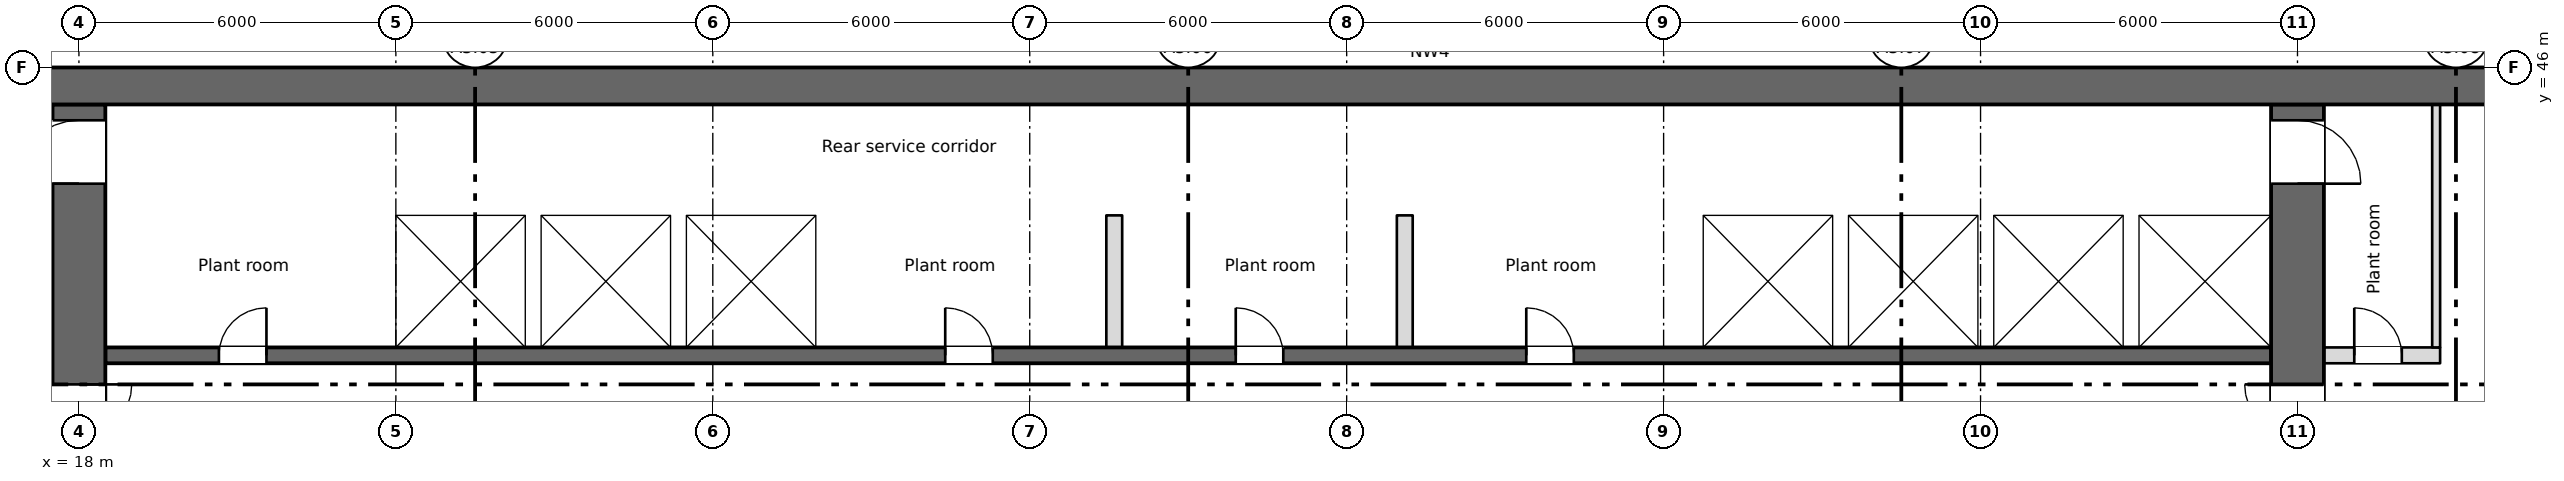
"""IFC4 building model, lengths in metres.
Left out: names, types, materials, properties, quantities, classifications, styles, units other than length and angle.
Written with IfcOpenShell. Run it as: python <this file> out.ifc"""

import sys

from ifc_helpers import new_model, si_unit, direction, frame, frame_2d, origin, place, context, subcontext, project, spatial, rectangle, extrude, element, fill, save


model = new_model("IFC4")
c1 = context("Model", 3, precision=1e-05, world=origin(), true_north=direction((0.0, 1.0)))
c2 = subcontext(c1, "Body", "Model", "MODEL_VIEW")
j1 = project(units=[si_unit("LENGTHUNIT", "METRE"), si_unit("PLANEANGLEUNIT", "RADIAN")], contexts=[c1])
p1 = place(None, origin())
s1 = spatial("IfcSite", under=j1, at=p1, CompositionType="ELEMENT")
p2 = place(p1, origin())
s2 = spatial("IfcBuilding", under=s1, at=p2, CompositionType="ELEMENT")
p3 = place(p2, frame((0.0, 0.0, 226.75)))
s3 = spatial("IfcBuildingStorey", under=s2, at=p3, CompositionType="ELEMENT", Elevation=226.75)
p4 = place(p3, frame((11.55, 45.65, 0.0), z_axis=(0.0, 0.0, 1.0), x_axis=(1.0, 0.0, 0.0)))
e1 = element("IfcWall", 1, at=p4, inside=s3, PredefinedType="SHEAR", context=c2, shape_type="SweptSolid", body=[
    extrude(rectangle(XDim=54.9, YDim=0.7, at=frame_2d((27.45, 0.0))), origin(), (0.0, 0.0, 1.0), 4.2),
])
p5 = place(p3, frame((18.0, 28.4, 0.0), z_axis=(0.0, 0.0, 1.0), x_axis=(0.0, 1.0, 0.0)))
e2 = element("IfcWall", 2, at=p5, inside=s3, PredefinedType="SHEAR", context=c2, shape_type="SweptSolid", body=[
    extrude(rectangle(XDim=16.9, YDim=1.0, at=frame_2d((8.45, 0.0))), origin(), (0.0, 0.0, 1.0), 4.2),
])
p6 = place(p5, frame((9.6, 0.0, 0.0)))
e3 = element("IfcOpeningElement", 3, at=p6, cuts=e2, PredefinedType="OPENING", context=c2, shape_type="SweptSolid", body=[
    extrude(rectangle(XDim=2.0, YDim=2.1, at=frame_2d((1.0, 1.05))), frame((0.0, 0.51, 0.0), z_axis=(0.0, -1.0, 0.0), x_axis=(1.0, 0.0, 0.0)), (0.0, 0.0, 1.0), 1.02),
])
p7 = place(p5, frame((15.4, 0.0, 0.0)))
e4 = element("IfcOpeningElement", 4, at=p7, cuts=e2, PredefinedType="OPENING", context=c2, shape_type="SweptSolid", body=[
    extrude(rectangle(XDim=1.2, YDim=2.1, at=frame_2d((0.6, 1.05))), frame((0.0, 0.51, 0.0), z_axis=(0.0, -1.0, 0.0), x_axis=(1.0, 0.0, 0.0)), (0.0, 0.0, 1.0), 1.02),
])
p8 = place(p3, frame((60.0, 28.4, 0.0), z_axis=(0.0, 0.0, 1.0), x_axis=(0.0, 1.0, 0.0)))
e5 = element("IfcWall", 5, at=p8, inside=s3, PredefinedType="SHEAR", context=c2, shape_type="SweptSolid", body=[
    extrude(rectangle(XDim=16.9, YDim=1.0, at=frame_2d((8.45, 0.0))), origin(), (0.0, 0.0, 1.0), 4.2),
])
p9 = place(p8, frame((9.6, 0.0, 0.0)))
e6 = element("IfcOpeningElement", 6, at=p9, cuts=e5, PredefinedType="OPENING", context=c2, shape_type="SweptSolid", body=[
    extrude(rectangle(XDim=2.0, YDim=2.1, at=frame_2d((1.0, 1.05))), frame((0.0, 0.51, 0.0), z_axis=(0.0, -1.0, 0.0), x_axis=(1.0, 0.0, 0.0)), (0.0, 0.0, 1.0), 1.02),
])
p10 = place(p8, frame((15.4, 0.0, 0.0)))
e7 = element("IfcOpeningElement", 7, at=p10, cuts=e5, PredefinedType="OPENING", context=c2, shape_type="SweptSolid", body=[
    extrude(rectangle(XDim=1.2, YDim=2.1, at=frame_2d((0.6, 1.05))), frame((0.0, 0.51, 0.0), z_axis=(0.0, -1.0, 0.0), x_axis=(1.0, 0.0, 0.0)), (0.0, 0.0, 1.0), 1.02),
])
p11 = place(p3, frame((18.5, 40.55, 0.0), z_axis=(0.0, 0.0, 1.0), x_axis=(1.0, 0.0, 0.0)))
e8 = element("IfcWall", 8, at=p11, inside=s3, PredefinedType="SHEAR", context=c2, shape_type="SweptSolid", body=[
    extrude(rectangle(XDim=41.0, YDim=0.3, at=frame_2d((20.5, 0.0))), origin(), (0.0, 0.0, 1.0), 4.2),
])
p12 = place(p11, frame((2.15, 0.0, 0.0)))
e9 = element("IfcOpeningElement", 9, at=p12, cuts=e8, PredefinedType="OPENING", context=c2, shape_type="SweptSolid", body=[
    extrude(rectangle(XDim=0.9, YDim=2.1, at=frame_2d((0.45, 1.05))), frame((0.0, 0.16, 0.0), z_axis=(0.0, -1.0, 0.0), x_axis=(1.0, 0.0, 0.0)), (0.0, 0.0, 1.0), 0.32),
])
p13 = place(p11, frame((15.9, 0.0, 0.0)))
e10 = element("IfcOpeningElement", 10, at=p13, cuts=e8, PredefinedType="OPENING", context=c2, shape_type="SweptSolid", body=[
    extrude(rectangle(XDim=0.9, YDim=2.1, at=frame_2d((0.45, 1.05))), frame((0.0, 0.16, 0.0), z_axis=(0.0, -1.0, 0.0), x_axis=(1.0, 0.0, 0.0)), (0.0, 0.0, 1.0), 0.32),
])
p14 = place(p11, frame((21.4, 0.0, 0.0)))
e11 = element("IfcOpeningElement", 11, at=p14, cuts=e8, PredefinedType="OPENING", context=c2, shape_type="SweptSolid", body=[
    extrude(rectangle(XDim=0.9, YDim=2.1, at=frame_2d((0.45, 1.05))), frame((0.0, 0.16, 0.0), z_axis=(0.0, -1.0, 0.0), x_axis=(1.0, 0.0, 0.0)), (0.0, 0.0, 1.0), 0.32),
])
p15 = place(p11, frame((26.9, 0.0, 0.0)))
e12 = element("IfcOpeningElement", 12, at=p15, cuts=e8, PredefinedType="OPENING", context=c2, shape_type="SweptSolid", body=[
    extrude(rectangle(XDim=0.9, YDim=2.1, at=frame_2d((0.45, 1.05))), frame((0.0, 0.16, 0.0), z_axis=(0.0, -1.0, 0.0), x_axis=(1.0, 0.0, 0.0)), (0.0, 0.0, 1.0), 0.32),
])
p16 = place(p11, frame((6.175, 0.0, 0.0)))
e13 = element("IfcOpeningElement", 13, at=p16, cuts=e8, PredefinedType="OPENING", context=c2, shape_type="SweptSolid", body=[
    extrude(rectangle(XDim=1.1, YDim=2.1, at=frame_2d((0.55, 1.05))), frame((0.0, 0.16, 0.0), z_axis=(0.0, -1.0, 0.0), x_axis=(1.0, 0.0, 0.0)), (0.0, 0.0, 1.0), 0.32),
])
p17 = place(p11, frame((8.925, 0.0, 0.0)))
e14 = element("IfcOpeningElement", 14, at=p17, cuts=e8, PredefinedType="OPENING", context=c2, shape_type="SweptSolid", body=[
    extrude(rectangle(XDim=1.1, YDim=2.1, at=frame_2d((0.55, 1.05))), frame((0.0, 0.16, 0.0), z_axis=(0.0, -1.0, 0.0), x_axis=(1.0, 0.0, 0.0)), (0.0, 0.0, 1.0), 0.32),
])
p18 = place(p11, frame((11.675, 0.0, 0.0)))
e15 = element("IfcOpeningElement", 15, at=p18, cuts=e8, PredefinedType="OPENING", context=c2, shape_type="SweptSolid", body=[
    extrude(rectangle(XDim=1.1, YDim=2.1, at=frame_2d((0.55, 1.05))), frame((0.0, 0.16, 0.0), z_axis=(0.0, -1.0, 0.0), x_axis=(1.0, 0.0, 0.0)), (0.0, 0.0, 1.0), 0.32),
])
p19 = place(p11, frame((30.925, 0.0, 0.0)))
e16 = element("IfcOpeningElement", 16, at=p19, cuts=e8, PredefinedType="OPENING", context=c2, shape_type="SweptSolid", body=[
    extrude(rectangle(XDim=1.1, YDim=2.1, at=frame_2d((0.55, 1.05))), frame((0.0, 0.16, 0.0), z_axis=(0.0, -1.0, 0.0), x_axis=(1.0, 0.0, 0.0)), (0.0, 0.0, 1.0), 0.32),
])
p20 = place(p11, frame((33.675, 0.0, 0.0)))
e17 = element("IfcOpeningElement", 17, at=p20, cuts=e8, PredefinedType="OPENING", context=c2, shape_type="SweptSolid", body=[
    extrude(rectangle(XDim=1.1, YDim=2.1, at=frame_2d((0.55, 1.05))), frame((0.0, 0.16, 0.0), z_axis=(0.0, -1.0, 0.0), x_axis=(1.0, 0.0, 0.0)), (0.0, 0.0, 1.0), 0.32),
])
p21 = place(p11, frame((36.375, 0.0, 0.0)))
e18 = element("IfcOpeningElement", 18, at=p21, cuts=e8, PredefinedType="OPENING", context=c2, shape_type="SweptSolid", body=[
    extrude(rectangle(XDim=1.2, YDim=2.1, at=frame_2d((0.6, 1.05))), frame((0.0, 0.16, 0.0), z_axis=(0.0, -1.0, 0.0), x_axis=(1.0, 0.0, 0.0)), (0.0, 0.0, 1.0), 0.32),
])
p22 = place(p11, frame((39.15, 0.0, 0.0)))
e19 = element("IfcOpeningElement", 19, at=p22, cuts=e8, PredefinedType="OPENING", context=c2, shape_type="SweptSolid", body=[
    extrude(rectangle(XDim=1.2, YDim=2.1, at=frame_2d((0.6, 1.05))), frame((0.0, 0.16, 0.0), z_axis=(0.0, -1.0, 0.0), x_axis=(1.0, 0.0, 0.0)), (0.0, 0.0, 1.0), 0.32),
])
p23 = place(p3, frame((18.5, 43.35, 0.0), z_axis=(0.0, 0.0, 1.0), x_axis=(1.0, 0.0, 0.0)))
e20 = element("IfcWall", 20, at=p23, inside=s3, PredefinedType="SHEAR", context=c2, shape_type="SweptSolid", body=[
    extrude(rectangle(XDim=41.0, YDim=0.3, at=frame_2d((20.5, 0.0))), origin(), (0.0, 0.0, 1.0), 4.2),
])
p24 = place(p3, frame((60.5, 40.55, 0.0), z_axis=(0.0, 0.0, 1.0), x_axis=(1.0, 0.0, 0.0)))
e21 = element("IfcWall", 21, at=p24, inside=s3, PredefinedType="PARTITIONING", context=c2, shape_type="SweptSolid", body=[
    extrude(rectangle(XDim=2.2, YDim=0.3, at=frame_2d((1.1, 0.0))), origin(), (0.0, 0.0, 1.0), 4.2),
])
p25 = place(p24, frame((0.575, 0.0, 0.0)))
e22 = element("IfcOpeningElement", 22, at=p25, cuts=e21, PredefinedType="OPENING", context=c2, shape_type="SweptSolid", body=[
    extrude(rectangle(XDim=0.9, YDim=2.1, at=frame_2d((0.45, 1.05))), frame((0.0, 0.16, 0.0), z_axis=(0.0, -1.0, 0.0), x_axis=(1.0, 0.0, 0.0)), (0.0, 0.0, 1.0), 0.32),
])
for number, where, z_axis, x_axis in (
    (23, (23.85, 40.7, 0.0), (0.0, 0.0, 1.0), (0.0, 1.0, 0.0)),
    (24, (26.6, 40.7, 0.0), (0.0, 0.0, 1.0), (0.0, 1.0, 0.0)),
    (25, (29.35, 40.7, 0.0), (0.0, 0.0, 1.0), (0.0, 1.0, 0.0)),
    (26, (32.1, 40.7, 0.0), (0.0, 0.0, 1.0), (0.0, 1.0, 0.0)),
    (27, (48.6, 40.7, 0.0), (0.0, 0.0, 1.0), (0.0, 1.0, 0.0)),
    (28, (51.35, 40.7, 0.0), (0.0, 0.0, 1.0), (0.0, 1.0, 0.0)),
    (29, (54.1, 40.7, 0.0), (0.0, 0.0, 1.0), (0.0, 1.0, 0.0)),
    (30, (56.85, 40.7, 0.0), (0.0, 0.0, 1.0), (0.0, 1.0, 0.0)),
):
    element("IfcWall", number, at=place(p3, frame(where, z_axis=z_axis, x_axis=x_axis)), inside=s3, PredefinedType="SHEAR", context=c2, shape_type="SweptSolid", body=[
        extrude(rectangle(XDim=2.5, YDim=0.3, at=frame_2d((1.25, 0.0))), origin(), (0.0, 0.0, 1.0), 4.2),
    ])
p26 = place(p3, frame((62.625, 40.7, 0.0), z_axis=(0.0, 0.0, 1.0), x_axis=(0.0, 1.0, 0.0)))
e31 = element("IfcWall", 31, at=p26, inside=s3, PredefinedType="PARTITIONING", context=c2, shape_type="SweptSolid", body=[
    extrude(rectangle(XDim=4.6, YDim=0.15, at=frame_2d((2.3, 0.0))), origin(), (0.0, 0.0, 1.0), 4.2),
])
for number, where, z_axis, x_axis in (
    (32, (37.6, 40.7, 0.0), (0.0, 0.0, 1.0), (0.0, 1.0, 0.0)),
    (33, (43.1, 40.7, 0.0), (0.0, 0.0, 1.0), (0.0, 1.0, 0.0)),
):
    element("IfcWall", number, at=place(p3, frame(where, z_axis=z_axis, x_axis=x_axis)), inside=s3, PredefinedType="PARTITIONING", context=c2, shape_type="SweptSolid", body=[
        extrude(rectangle(XDim=2.5, YDim=0.3, at=frame_2d((1.25, 0.0))), origin(), (0.0, 0.0, 1.0), 4.2),
    ])
p27 = place(p25, origin())
e34 = element("IfcDoor", 34, at=p27, inside=s3, OperationType="SINGLE_SWING_LEFT", PredefinedType="DOOR", context=c2, shape_type="SweptSolid", body=[
    extrude(rectangle(XDim=0.9, YDim=2.1, at=frame_2d((0.45, 1.05))), frame((0.0, 0.025, 0.0), z_axis=(0.0, -1.0, 0.0), x_axis=(1.0, 0.0, 0.0)), (0.0, 0.0, 1.0), 0.05),
])
fill(e22, e34)
p28 = place(p12, origin())
e35 = element("IfcDoor", 35, at=p28, inside=s3, OperationType="SINGLE_SWING_RIGHT", PredefinedType="DOOR", context=c2, shape_type="SweptSolid", body=[
    extrude(rectangle(XDim=0.9, YDim=2.1, at=frame_2d((0.45, 1.05))), frame((0.0, 0.025, 0.0), z_axis=(0.0, -1.0, 0.0), x_axis=(1.0, 0.0, 0.0)), (0.0, 0.0, 1.0), 0.05),
])
fill(e9, e35)
p29 = place(p13, origin())
e36 = element("IfcDoor", 36, at=p29, inside=s3, OperationType="SINGLE_SWING_LEFT", PredefinedType="DOOR", context=c2, shape_type="SweptSolid", body=[
    extrude(rectangle(XDim=0.9, YDim=2.1, at=frame_2d((0.45, 1.05))), frame((0.0, 0.025, 0.0), z_axis=(0.0, -1.0, 0.0), x_axis=(1.0, 0.0, 0.0)), (0.0, 0.0, 1.0), 0.05),
])
fill(e10, e36)
p30 = place(p14, origin())
e37 = element("IfcDoor", 37, at=p30, inside=s3, OperationType="SINGLE_SWING_LEFT", PredefinedType="DOOR", context=c2, shape_type="SweptSolid", body=[
    extrude(rectangle(XDim=0.9, YDim=2.1, at=frame_2d((0.45, 1.05))), frame((0.0, 0.025, 0.0), z_axis=(0.0, -1.0, 0.0), x_axis=(1.0, 0.0, 0.0)), (0.0, 0.0, 1.0), 0.05),
])
fill(e11, e37)
p31 = place(p15, origin())
e38 = element("IfcDoor", 38, at=p31, inside=s3, OperationType="SINGLE_SWING_LEFT", PredefinedType="DOOR", context=c2, shape_type="SweptSolid", body=[
    extrude(rectangle(XDim=0.9, YDim=2.1, at=frame_2d((0.45, 1.05))), frame((0.0, 0.025, 0.0), z_axis=(0.0, -1.0, 0.0), x_axis=(1.0, 0.0, 0.0)), (0.0, 0.0, 1.0), 0.05),
])
fill(e12, e38)
p32 = place(p16, origin())
e39 = element("IfcDoor", 39, at=p32, inside=s3, OperationType="SLIDING_TO_LEFT", PredefinedType="DOOR", context=c2, shape_type="SweptSolid", body=[
    extrude(rectangle(XDim=1.1, YDim=2.1, at=frame_2d((0.55, 1.05))), frame((0.0, 0.025, 0.0), z_axis=(0.0, -1.0, 0.0), x_axis=(1.0, 0.0, 0.0)), (0.0, 0.0, 1.0), 0.05),
])
fill(e13, e39)
p33 = place(p17, origin())
e40 = element("IfcDoor", 40, at=p33, inside=s3, OperationType="SLIDING_TO_LEFT", PredefinedType="DOOR", context=c2, shape_type="SweptSolid", body=[
    extrude(rectangle(XDim=1.1, YDim=2.1, at=frame_2d((0.55, 1.05))), frame((0.0, 0.025, 0.0), z_axis=(0.0, -1.0, 0.0), x_axis=(1.0, 0.0, 0.0)), (0.0, 0.0, 1.0), 0.05),
])
fill(e14, e40)
p34 = place(p18, origin())
e41 = element("IfcDoor", 41, at=p34, inside=s3, OperationType="SLIDING_TO_LEFT", PredefinedType="DOOR", context=c2, shape_type="SweptSolid", body=[
    extrude(rectangle(XDim=1.1, YDim=2.1, at=frame_2d((0.55, 1.05))), frame((0.0, 0.025, 0.0), z_axis=(0.0, -1.0, 0.0), x_axis=(1.0, 0.0, 0.0)), (0.0, 0.0, 1.0), 0.05),
])
fill(e15, e41)
p35 = place(p19, origin())
e42 = element("IfcDoor", 42, at=p35, inside=s3, OperationType="SLIDING_TO_LEFT", PredefinedType="DOOR", context=c2, shape_type="SweptSolid", body=[
    extrude(rectangle(XDim=1.1, YDim=2.1, at=frame_2d((0.55, 1.05))), frame((0.0, 0.025, 0.0), z_axis=(0.0, -1.0, 0.0), x_axis=(1.0, 0.0, 0.0)), (0.0, 0.0, 1.0), 0.05),
])
fill(e16, e42)
p36 = place(p20, origin())
e43 = element("IfcDoor", 43, at=p36, inside=s3, OperationType="SLIDING_TO_LEFT", PredefinedType="DOOR", context=c2, shape_type="SweptSolid", body=[
    extrude(rectangle(XDim=1.1, YDim=2.1, at=frame_2d((0.55, 1.05))), frame((0.0, 0.025, 0.0), z_axis=(0.0, -1.0, 0.0), x_axis=(1.0, 0.0, 0.0)), (0.0, 0.0, 1.0), 0.05),
])
fill(e17, e43)
p37 = place(p21, origin())
e44 = element("IfcDoor", 44, at=p37, inside=s3, OperationType="SLIDING_TO_LEFT", PredefinedType="DOOR", context=c2, shape_type="SweptSolid", body=[
    extrude(rectangle(XDim=1.2, YDim=2.1, at=frame_2d((0.6, 1.05))), frame((0.0, 0.025, 0.0), z_axis=(0.0, -1.0, 0.0), x_axis=(1.0, 0.0, 0.0)), (0.0, 0.0, 1.0), 0.05),
])
fill(e18, e44)
p38 = place(p22, origin())
e45 = element("IfcDoor", 45, at=p38, inside=s3, OperationType="SLIDING_TO_LEFT", PredefinedType="DOOR", context=c2, shape_type="SweptSolid", body=[
    extrude(rectangle(XDim=1.2, YDim=2.1, at=frame_2d((0.6, 1.05))), frame((0.0, 0.025, 0.0), z_axis=(0.0, -1.0, 0.0), x_axis=(1.0, 0.0, 0.0)), (0.0, 0.0, 1.0), 0.05),
])
fill(e19, e45)
p39 = place(p6, origin())
e46 = element("IfcDoor", 46, at=p39, inside=s3, OperationType="DOUBLE_DOOR_SINGLE_SWING", PredefinedType="DOOR", context=c2, shape_type="SweptSolid", body=[
    extrude(rectangle(XDim=2.0, YDim=2.1, at=frame_2d((1.0, 1.05))), frame((0.0, 0.025, 0.0), z_axis=(0.0, -1.0, 0.0), x_axis=(1.0, 0.0, 0.0)), (0.0, 0.0, 1.0), 0.05),
])
fill(e3, e46)
p40 = place(p9, origin())
e47 = element("IfcDoor", 47, at=p40, inside=s3, OperationType="DOUBLE_DOOR_SINGLE_SWING", PredefinedType="DOOR", context=c2, shape_type="SweptSolid", body=[
    extrude(rectangle(XDim=2.0, YDim=2.1, at=frame_2d((1.0, 1.05))), frame((0.0, 0.025, 0.0), z_axis=(0.0, -1.0, 0.0), x_axis=(1.0, 0.0, 0.0)), (0.0, 0.0, 1.0), 0.05),
])
fill(e6, e47)
p41 = place(p7, origin())
e48 = element("IfcDoor", 48, at=p41, inside=s3, OperationType="SINGLE_SWING_LEFT", PredefinedType="DOOR", context=c2, shape_type="SweptSolid", body=[
    extrude(rectangle(XDim=1.2, YDim=2.1, at=frame_2d((0.6, 1.05))), frame((0.0, 0.025, 0.0), z_axis=(0.0, -1.0, 0.0), x_axis=(1.0, 0.0, 0.0)), (0.0, 0.0, 1.0), 0.05),
])
fill(e4, e48)
p42 = place(p10, origin())
e49 = element("IfcDoor", 49, at=p42, inside=s3, OperationType="SINGLE_SWING_LEFT", PredefinedType="DOOR", context=c2, shape_type="SweptSolid", body=[
    extrude(rectangle(XDim=1.2, YDim=2.1, at=frame_2d((0.6, 1.05))), frame((0.0, 0.025, 0.0), z_axis=(0.0, -1.0, 0.0), x_axis=(1.0, 0.0, 0.0)), (0.0, 0.0, 1.0), 0.05),
])
fill(e7, e49)
save(model, sys.argv[1])
